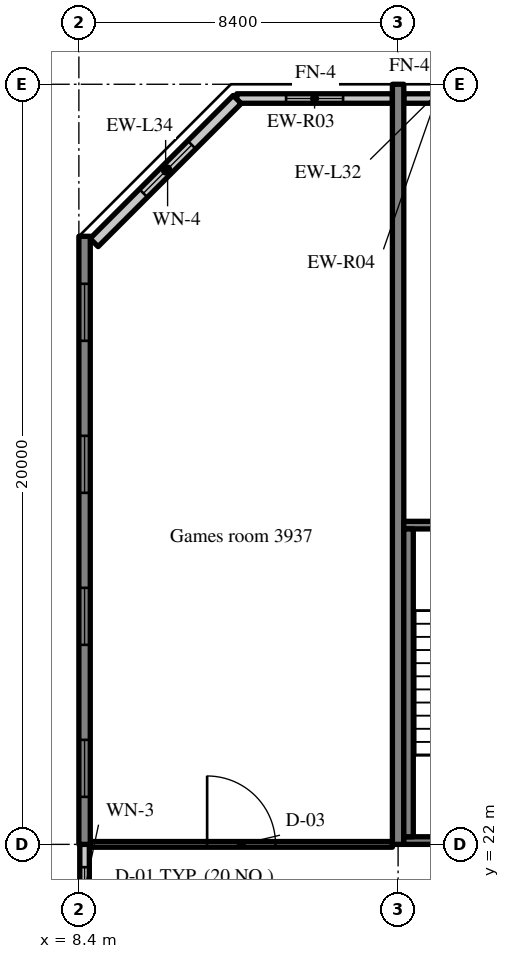
"""IFC4 building model, lengths in metres.
Left out: names, types, materials, properties, quantities, classifications, styles, units other than length and angle.
Written with IfcOpenShell. Run it as: python <this file> out.ifc"""

import sys

from ifc_helpers import new_model, si_unit, direction, frame, frame_2d, origin, place, context, subcontext, project, spatial, rectangle, extrude, source, transform, mapped, element, fill, save


model = new_model("IFC4")
c1 = context("Model", 3, precision=1e-05, world=origin(), true_north=direction((0.0, 1.0)))
c2 = subcontext(c1, "Body", "Model", "MODEL_VIEW")
j1 = project(units=[si_unit("LENGTHUNIT", "METRE"), si_unit("PLANEANGLEUNIT", "RADIAN")], contexts=[c1])
p1 = place(None, origin())
s1 = spatial("IfcSite", under=j1, at=p1, CompositionType="ELEMENT")
p2 = place(p1, origin())
s2 = spatial("IfcBuilding", under=s1, at=p2, CompositionType="ELEMENT")
p3 = place(p2, frame((0.0, 0.0, 163.0)))
s3 = spatial("IfcBuildingStorey", under=s2, at=p3, CompositionType="ELEMENT", Elevation=163.0)
m1 = source(origin(), c2, "Body", "SweptSolid", [
    extrude(rectangle(XDim=16.0, YDim=0.3, at=frame_2d((8.0, 0.0))), origin(), (0.0, 0.0, 1.0), 3.52),
])
p4 = place(p3, frame((8.55, 22.0, 0.0), z_axis=(0.0, 0.0, 1.0), x_axis=(0.0, 1.0, 0.0)))
e1 = element("IfcWall", 1, at=p4, inside=s3, PredefinedType="SHEAR", context=c2, shape_type="MappedRepresentation", body=[
    mapped(m1, transform((0.0, 0.0, 0.0), scale=1.0)),
])
m2 = source(origin(), c2, "Body", "SweptSolid", [
    extrude(rectangle(XDim=1.5, YDim=1.5, at=frame_2d((0.75, 0.75))), frame((0.0, 0.16, 0.0), z_axis=(0.0, -1.0, 0.0), x_axis=(1.0, 0.0, 0.0)), (0.0, 0.0, 1.0), 0.32),
])
p5 = place(p4, frame((1.25, 0.0, 0.9)))
e2 = element("IfcOpeningElement", 2, at=p5, cuts=e1, PredefinedType="OPENING", context=c2, shape_type="MappedRepresentation", body=[
    mapped(m2, transform((0.0, 0.0, 0.0), scale=1.0)),
])
p6 = place(p4, frame((5.25, 0.0, 0.9)))
e3 = element("IfcOpeningElement", 3, at=p6, cuts=e1, PredefinedType="OPENING", context=c2, shape_type="MappedRepresentation", body=[
    mapped(m2, transform((0.0, 0.0, 0.0), scale=1.0)),
])
p7 = place(p4, frame((9.25, 0.0, 0.9)))
e4 = element("IfcOpeningElement", 4, at=p7, cuts=e1, PredefinedType="OPENING", context=c2, shape_type="MappedRepresentation", body=[
    mapped(m2, transform((0.0, 0.0, 0.0), scale=1.0)),
])
p8 = place(p4, frame((13.25, 0.0, 0.9)))
e5 = element("IfcOpeningElement", 5, at=p8, cuts=e1, PredefinedType="OPENING", context=c2, shape_type="MappedRepresentation", body=[
    mapped(m2, transform((0.0, 0.0, 0.0), scale=1.0)),
])
m3 = source(origin(), c2, "Body", "SweptSolid", [
    extrude(rectangle(XDim=20.0, YDim=0.3, at=frame_2d((10.0, 0.0))), origin(), (0.0, 0.0, 1.0), 3.52),
])
p9 = place(p3, frame((16.8, 22.0, 0.0), z_axis=(0.0, 0.0, 1.0), x_axis=(0.0, 1.0, 0.0)))
e6 = element("IfcWall", 6, at=p9, inside=s3, PredefinedType="SHEAR", context=c2, shape_type="MappedRepresentation", body=[
    mapped(m3, transform((0.0, 0.0, 0.0), scale=1.0)),
])
m4 = source(origin(), c2, "Body", "SweptSolid", [
    extrude(rectangle(XDim=4.094, YDim=0.25, at=frame_2d((2.047, 0.0))), origin(), (0.0, 0.0, 1.0), 2.87),
])
p10 = place(p3, frame((16.65, 41.625, 0.0), z_axis=(0.0, 0.0, 1.0), x_axis=(-1.0, 0.0, 0.0)))
e7 = element("IfcWall", 7, at=p10, inside=s3, PredefinedType="SOLIDWALL", context=c2, shape_type="MappedRepresentation", body=[
    mapped(m4, transform((0.0, 0.0, 0.0), scale=1.0)),
])
m5 = source(origin(), c2, "Body", "SweptSolid", [
    extrude(rectangle(XDim=1.5, YDim=1.5, at=frame_2d((0.75, 0.75))), frame((0.0, 0.135, 0.0), z_axis=(0.0, -1.0, 0.0), x_axis=(1.0, 0.0, 0.0)), (0.0, 0.0, 1.0), 0.27),
])
p11 = place(p10, frame((1.297, 0.0, 0.9)))
e8 = element("IfcOpeningElement", 8, at=p11, cuts=e7, PredefinedType="OPENING", context=c2, shape_type="MappedRepresentation", body=[
    mapped(m5, transform((0.0, 0.0, 0.0), scale=1.0)),
])
m6 = source(origin(), c2, "Body", "SweptSolid", [
    extrude(rectangle(XDim=1.708, YDim=0.25, at=frame_2d((0.854, 0.0))), origin(), (0.0, 0.0, 1.0), 2.87),
])
p12 = place(p3, frame((18.658, 41.625, 0.0), z_axis=(0.0, 0.0, 1.0), x_axis=(-1.0, 0.0, 0.0)))
e9 = element("IfcWall", 9, at=p12, inside=s3, PredefinedType="SOLIDWALL", context=c2, shape_type="MappedRepresentation", body=[
    mapped(m6, transform((0.0, 0.0, 0.0), scale=1.0)),
])
m7 = source(origin(), c2, "Body", "SweptSolid", [
    extrude(rectangle(XDim=5.326, YDim=0.3, at=frame_2d((2.663, 0.0))), origin(), (0.0, 0.0, 1.0), 3.52),
])
p13 = place(p3, frame((12.566, 41.6, 0.0), z_axis=(0.0, 0.0, 1.0), x_axis=(-0.707083859269, -0.707129702361, 0.0)))
e10 = element("IfcWall", 10, at=p13, inside=s3, PredefinedType="SOLIDWALL", context=c2, shape_type="MappedRepresentation", body=[
    mapped(m7, transform((0.0, 0.0, 0.0), scale=1.0)),
])
m8 = source(origin(), c2, "Body", "SweptSolid", [
    extrude(rectangle(XDim=1.8, YDim=1.5, at=frame_2d((0.9, 0.75))), frame((0.0, 0.16, 0.0), z_axis=(0.0, -1.0, 0.0), x_axis=(1.0, 0.0, 0.0)), (0.0, 0.0, 1.0), 0.32),
])
p14 = place(p13, frame((1.689, 0.0, 0.9)))
e11 = element("IfcOpeningElement", 11, at=p14, cuts=e10, PredefinedType="OPENING", context=c2, shape_type="MappedRepresentation", body=[
    mapped(m8, transform((0.0, 0.0, 0.0), scale=1.0)),
])
m9 = source(origin(), c2, "Body", "SweptSolid", [
    extrude(rectangle(XDim=2.4, YDim=0.25, at=frame_2d((1.2, 0.0))), origin(), (0.0, 0.0, 1.0), 2.62),
])
p15 = place(p3, frame((8.55, 19.6, 0.0), z_axis=(0.0, 0.0, 1.0), x_axis=(0.0, 1.0, 0.0)))
e12 = element("IfcWall", 12, at=p15, inside=s3, PredefinedType="SOLIDWALL", context=c2, shape_type="MappedRepresentation", body=[
    mapped(m9, transform((0.0, 0.0, 0.0), scale=1.0)),
])
m10 = source(origin(), c2, "Body", "SweptSolid", [
    extrude(rectangle(XDim=1.2, YDim=1.5, at=frame_2d((0.6, 0.75))), frame((0.0, 0.135, 0.0), z_axis=(0.0, -1.0, 0.0), x_axis=(1.0, 0.0, 0.0)), (0.0, 0.0, 1.0), 0.27),
])
p16 = place(p15, frame((0.6, 0.0, 0.9)))
e13 = element("IfcOpeningElement", 13, at=p16, cuts=e12, PredefinedType="OPENING", context=c2, shape_type="MappedRepresentation", body=[
    mapped(m10, transform((0.0, 0.0, 0.0), scale=1.0)),
])
m11 = source(origin(), c2, "Body", "SweptSolid", [
    extrude(rectangle(XDim=8.25, YDim=0.2, at=frame_2d((4.125, 0.0))), origin(), (0.0, 0.0, 1.0), 3.52),
])
p17 = place(p3, frame((16.95, 22.1, 0.0), z_axis=(0.0, 0.0, 1.0), x_axis=(1.0, 0.0, 0.0)))
e14 = element("IfcWall", 14, at=p17, inside=s3, PredefinedType="SOLIDWALL", context=c2, shape_type="MappedRepresentation", body=[
    mapped(m11, transform((0.0, 0.0, 0.0), scale=1.0)),
])
m12 = source(origin(), c2, "Body", "SweptSolid", [
    extrude(rectangle(XDim=1.2, YDim=2.1, at=frame_2d((0.6, 1.05))), frame((0.0, 0.11, 0.0), z_axis=(0.0, -1.0, 0.0), x_axis=(1.0, 0.0, 0.0)), (0.0, 0.0, 1.0), 0.22),
])
p18 = place(p17, frame((6.05, 0.0, 0.0)))
e15 = element("IfcOpeningElement", 15, at=p18, cuts=e14, PredefinedType="OPENING", context=c2, shape_type="MappedRepresentation", body=[
    mapped(m12, transform((0.0, 0.0, 0.0), scale=1.0)),
])
p19 = place(p3, frame((16.95, 30.4, 0.0), z_axis=(0.0, 0.0, 1.0), x_axis=(1.0, 0.0, 0.0)))
e16 = element("IfcWall", 16, at=p19, inside=s3, PredefinedType="SOLIDWALL", context=c2, shape_type="MappedRepresentation", body=[
    mapped(m11, transform((0.0, 0.0, 0.0), scale=1.0)),
])
m13 = source(origin(), c2, "Body", "SweptSolid", [
    extrude(rectangle(XDim=1.0, YDim=2.1, at=frame_2d((0.5, 1.05))), frame((0.0, 0.11, 0.0), z_axis=(0.0, -1.0, 0.0), x_axis=(1.0, 0.0, 0.0)), (0.0, 0.0, 1.0), 0.22),
])
p20 = place(p19, frame((6.15, 0.0, 0.0)))
e17 = element("IfcOpeningElement", 17, at=p20, cuts=e16, PredefinedType="OPENING", context=c2, shape_type="MappedRepresentation", body=[
    mapped(m13, transform((0.0, 0.0, 0.0), scale=1.0)),
])
m14 = source(origin(), c2, "Body", "SweptSolid", [
    extrude(rectangle(XDim=8.1, YDim=0.25, at=frame_2d((4.05, 0.0))), origin(), (0.0, 0.0, 1.0), 3.52),
])
p21 = place(p3, frame((17.075, 22.2, 0.0), z_axis=(0.0, 0.0, 1.0), x_axis=(0.0, 1.0, 0.0)))
e18 = element("IfcWall", 18, at=p21, inside=s3, PredefinedType="SOLIDWALL", context=c2, shape_type="MappedRepresentation", body=[
    mapped(m14, transform((0.0, 0.0, 0.0), scale=1.0)),
])
m15 = source(origin(), c2, "Body", "SweptSolid", [
    extrude(rectangle(XDim=7.95, YDim=0.15, at=frame_2d((3.975, 0.0))), origin(), (0.0, 0.0, 1.0), 2.82),
])
p22 = place(p3, frame((8.7, 22.0, 0.0), z_axis=(0.0, 0.0, 1.0), x_axis=(1.0, 0.0, 0.0)))
e19 = element("IfcWall", 19, at=p22, inside=s3, PredefinedType="PARTITIONING", context=c2, shape_type="MappedRepresentation", body=[
    mapped(m15, transform((0.0, 0.0, 0.0), scale=1.0)),
])
m16 = source(origin(), c2, "Body", "SweptSolid", [
    extrude(rectangle(XDim=1.8, YDim=2.1, at=frame_2d((0.9, 1.05))), frame((0.0, 0.085, 0.0), z_axis=(0.0, -1.0, 0.0), x_axis=(1.0, 0.0, 0.0)), (0.0, 0.0, 1.0), 0.17),
])
p23 = place(p22, frame((3.075, 0.0, 0.0)))
e20 = element("IfcOpeningElement", 20, at=p23, cuts=e19, PredefinedType="OPENING", context=c2, shape_type="MappedRepresentation", body=[
    mapped(m16, transform((0.0, 0.0, 0.0), scale=1.0)),
])
m17 = source(origin(), c2, "Body", "SweptSolid", [
    extrude(rectangle(XDim=1.5, YDim=1.5, at=frame_2d((0.75, 0.75))), frame((0.0, 0.03, 0.0), z_axis=(0.0, -1.0, 0.0), x_axis=(1.0, 0.0, 0.0)), (0.0, 0.0, 1.0), 0.06),
])
p24 = place(p11, origin())
e21 = element("IfcWindow", 21, at=p24, inside=s3, PartitioningType="SINGLE_PANEL", PredefinedType="WINDOW", context=c2, shape_type="MappedRepresentation", body=[
    mapped(m17, transform((0.0, 0.0, 0.0), scale=1.0)),
])
fill(e8, e21)
m18 = source(origin(), c2, "Body", "SweptSolid", [
    extrude(rectangle(XDim=1.8, YDim=1.5, at=frame_2d((0.9, 0.75))), frame((0.0, 0.03, 0.0), z_axis=(0.0, -1.0, 0.0), x_axis=(1.0, 0.0, 0.0)), (0.0, 0.0, 1.0), 0.06),
])
p25 = place(p14, origin())
e22 = element("IfcWindow", 22, at=p25, inside=s3, PartitioningType="SINGLE_PANEL", PredefinedType="WINDOW", context=c2, shape_type="MappedRepresentation", body=[
    mapped(m18, transform((0.0, 0.0, 0.0), scale=1.0)),
])
fill(e11, e22)
p26 = place(p5, origin())
e23 = element("IfcWindow", 23, at=p26, inside=s3, PartitioningType="SINGLE_PANEL", PredefinedType="WINDOW", context=c2, shape_type="MappedRepresentation", body=[
    mapped(m17, transform((0.0, 0.0, 0.0), scale=1.0)),
])
fill(e2, e23)
p27 = place(p6, origin())
e24 = element("IfcWindow", 24, at=p27, inside=s3, PartitioningType="SINGLE_PANEL", PredefinedType="WINDOW", context=c2, shape_type="MappedRepresentation", body=[
    mapped(m17, transform((0.0, 0.0, 0.0), scale=1.0)),
])
fill(e3, e24)
p28 = place(p7, origin())
e25 = element("IfcWindow", 25, at=p28, inside=s3, PartitioningType="SINGLE_PANEL", PredefinedType="WINDOW", context=c2, shape_type="MappedRepresentation", body=[
    mapped(m17, transform((0.0, 0.0, 0.0), scale=1.0)),
])
fill(e4, e25)
p29 = place(p8, origin())
e26 = element("IfcWindow", 26, at=p29, inside=s3, PartitioningType="SINGLE_PANEL", PredefinedType="WINDOW", context=c2, shape_type="MappedRepresentation", body=[
    mapped(m17, transform((0.0, 0.0, 0.0), scale=1.0)),
])
fill(e5, e26)
m19 = source(origin(), c2, "Body", "SweptSolid", [
    extrude(rectangle(XDim=1.2, YDim=1.5, at=frame_2d((0.6, 0.75))), frame((0.0, 0.03, 0.0), z_axis=(0.0, -1.0, 0.0), x_axis=(1.0, 0.0, 0.0)), (0.0, 0.0, 1.0), 0.06),
])
p30 = place(p16, origin())
e27 = element("IfcWindow", 27, at=p30, inside=s3, PartitioningType="SINGLE_PANEL", PredefinedType="WINDOW", context=c2, shape_type="MappedRepresentation", body=[
    mapped(m19, transform((0.0, 0.0, 0.0), scale=1.0)),
])
fill(e13, e27)
m20 = source(origin(), c2, "Body", "SweptSolid", [
    extrude(rectangle(XDim=1.8, YDim=2.1, at=frame_2d((0.9, 1.05))), frame((0.0, 0.025, 0.0), z_axis=(0.0, -1.0, 0.0), x_axis=(1.0, 0.0, 0.0)), (0.0, 0.0, 1.0), 0.05),
])
p31 = place(p23, origin())
e28 = element("IfcDoor", 28, at=p31, inside=s3, OperationType="DOUBLE_DOOR_SINGLE_SWING", PredefinedType="DOOR", context=c2, shape_type="MappedRepresentation", body=[
    mapped(m20, transform((0.0, 0.0, 0.0), scale=1.0)),
])
fill(e20, e28)
save(model, sys.argv[1])
